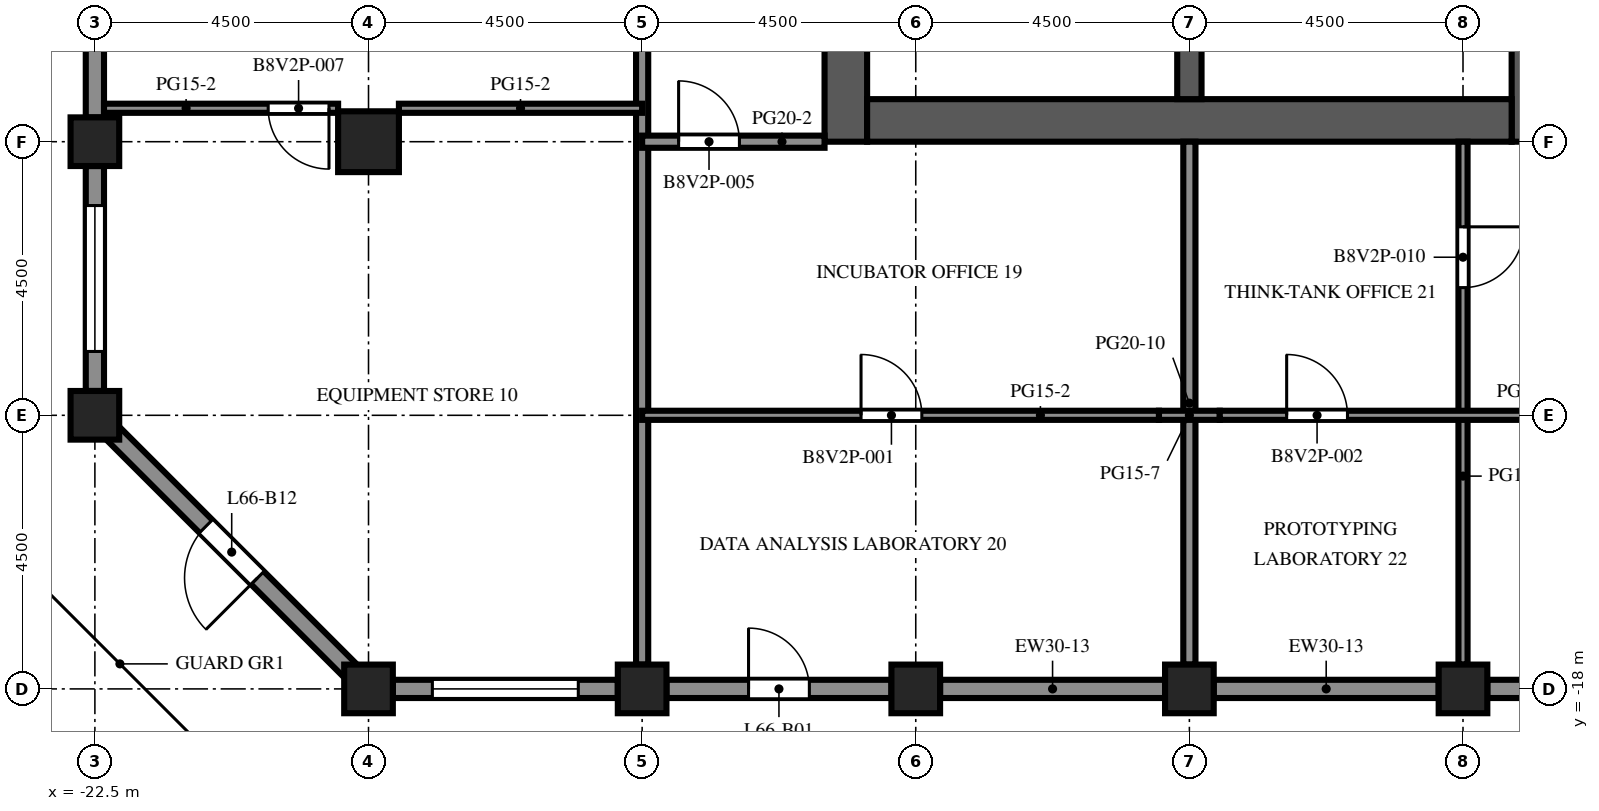
"""IFC4 building model, lengths in metres.
Left out: names, types, materials, properties, quantities, classifications, styles, units other than length and angle.
Written with IfcOpenShell. Run it as: python <this file> out.ifc"""

import sys

from ifc_helpers import new_model, si_unit, direction, frame, frame_2d, origin, origin_2d, place, context, subcontext, project, spatial, rectangle, extrude, element, fill, save


model = new_model("IFC4")
c1 = context("Model", 3, precision=1e-05, world=origin(), true_north=direction((0.0, 1.0)))
c2 = subcontext(c1, "Body", "Model", "MODEL_VIEW")
j1 = project(units=[si_unit("LENGTHUNIT", "METRE"), si_unit("PLANEANGLEUNIT", "RADIAN")], contexts=[c1])
p1 = place(None, origin())
s1 = spatial("IfcSite", under=j1, at=p1, CompositionType="ELEMENT")
p2 = place(p1, origin())
s2 = spatial("IfcBuilding", under=s1, at=p2, CompositionType="ELEMENT")
p3 = place(p2, frame((0.0, 0.0, 290.9)))
s3 = spatial("IfcBuildingStorey", under=s2, at=p3, CompositionType="ELEMENT", Elevation=290.9)
for number, where, z_axis, x_axis in (
    (1, (-22.5, -13.5, 0.0), (0.0, 0.0, 1.0), (1.0, 0.0, 0.0)),
    (2, (-22.5, -9.0, 0.0), (0.0, 0.0, 1.0), (1.0, 0.0, 0.0)),
    (3, (-18.0, -18.0, 0.0), (0.0, 0.0, 1.0), (1.0, 0.0, 0.0)),
    (4, (-13.5, -18.0, 0.0), (0.0, 0.0, 1.0), (1.0, 0.0, 0.0)),
    (5, (-9.0, -18.0, 0.0), (0.0, 0.0, 1.0), (1.0, 0.0, 0.0)),
    (6, (-4.5, -18.0, 0.0), (0.0, 0.0, 1.0), (1.0, 0.0, 0.0)),
    (7, (0.0, -18.0, 0.0), (0.0, 0.0, 1.0), (1.0, 0.0, 0.0)),
):
    element("IfcColumn", number, at=place(p3, frame(where, z_axis=z_axis, x_axis=x_axis)), inside=s3, PredefinedType="COLUMN", context=c2, shape_type="SweptSolid", body=[
        extrude(rectangle(XDim=0.8, YDim=0.8, at=origin_2d()), origin(), (0.0, 0.0, 1.0), 4.1),
    ])
p4 = place(p3, frame((-18.0, -9.0, 0.0), z_axis=(0.0, 0.0, 1.0), x_axis=(1.0, 0.0, 0.0)))
e8 = element("IfcColumn", 8, at=p4, inside=s3, PredefinedType="COLUMN", context=c2, shape_type="SweptSolid", body=[
    extrude(rectangle(XDim=1.0, YDim=1.0, at=origin_2d()), origin(), (0.0, 0.0, 1.0), 4.1),
])
p5 = place(p3, frame((-10.15, -9.0, 0.0), z_axis=(0.0, 0.0, 1.0), x_axis=(0.0, 1.0, 0.0)))
e9 = element("IfcWall", 9, at=p5, inside=s3, PredefinedType="SHEAR", context=c2, shape_type="SweptSolid", body=[
    extrude(rectangle(XDim=27.5, YDim=0.7, at=frame_2d((13.75, 0.0))), origin(), (0.0, 0.0, 1.0), 4.1),
])
p6 = place(p5, frame((12.55, 0.0, 0.0)))
e10 = element("IfcOpeningElement", 10, at=p6, cuts=e9, PredefinedType="OPENING", context=c2, shape_type="SweptSolid", body=[
    extrude(rectangle(XDim=2.4, YDim=2.4, at=frame_2d((1.2, 1.2))), frame((0.0, 0.36, 0.0), z_axis=(0.0, -1.0, 0.0), x_axis=(1.0, 0.0, 0.0)), (0.0, 0.0, 1.0), 0.72),
])
p7 = place(p5, frame((6.825, 0.0, 0.0)))
e11 = element("IfcOpeningElement", 11, at=p7, cuts=e9, PredefinedType="OPENING", context=c2, shape_type="SweptSolid", body=[
    extrude(rectangle(XDim=1.2, YDim=2.1, at=frame_2d((0.6, 1.05))), frame((0.0, 0.36, 0.0), z_axis=(0.0, -1.0, 0.0), x_axis=(1.0, 0.0, 0.0)), (0.0, 0.0, 1.0), 0.72),
])
p8 = place(p5, frame((19.475, 0.0, 0.0)))
e12 = element("IfcOpeningElement", 12, at=p8, cuts=e9, PredefinedType="OPENING", context=c2, shape_type="SweptSolid", body=[
    extrude(rectangle(XDim=1.2, YDim=2.1, at=frame_2d((0.6, 1.05))), frame((0.0, 0.36, 0.0), z_axis=(0.0, -1.0, 0.0), x_axis=(1.0, 0.0, 0.0)), (0.0, 0.0, 1.0), 0.72),
])
p9 = place(p3, frame((1.15, -9.0, 0.0), z_axis=(0.0, 0.0, 1.0), x_axis=(0.0, 1.0, 0.0)))
e13 = element("IfcWall", 13, at=p9, inside=s3, PredefinedType="SHEAR", context=c2, shape_type="SweptSolid", body=[
    extrude(rectangle(XDim=27.5, YDim=0.7, at=frame_2d((13.75, 0.0))), origin(), (0.0, 0.0, 1.0), 4.1),
])
p10 = place(p9, frame((12.55, 0.0, 0.0)))
e14 = element("IfcOpeningElement", 14, at=p10, cuts=e13, PredefinedType="OPENING", context=c2, shape_type="SweptSolid", body=[
    extrude(rectangle(XDim=2.4, YDim=2.4, at=frame_2d((1.2, 1.2))), frame((0.0, 0.36, 0.0), z_axis=(0.0, -1.0, 0.0), x_axis=(1.0, 0.0, 0.0)), (0.0, 0.0, 1.0), 0.72),
])
p11 = place(p9, frame((3.9, 0.0, 0.0)))
e15 = element("IfcOpeningElement", 15, at=p11, cuts=e13, PredefinedType="OPENING", context=c2, shape_type="SweptSolid", body=[
    extrude(rectangle(XDim=1.2, YDim=2.1, at=frame_2d((0.6, 1.05))), frame((0.0, 0.36, 0.0), z_axis=(0.0, -1.0, 0.0), x_axis=(1.0, 0.0, 0.0)), (0.0, 0.0, 1.0), 0.72),
])
p12 = place(p9, frame((22.4, 0.0, 0.0)))
e16 = element("IfcOpeningElement", 16, at=p12, cuts=e13, PredefinedType="OPENING", context=c2, shape_type="SweptSolid", body=[
    extrude(rectangle(XDim=1.2, YDim=2.1, at=frame_2d((0.6, 1.05))), frame((0.0, 0.36, 0.0), z_axis=(0.0, -1.0, 0.0), x_axis=(1.0, 0.0, 0.0)), (0.0, 0.0, 1.0), 0.72),
])
p13 = place(p3, frame((-9.8, -8.65, 0.0), z_axis=(0.0, 0.0, 1.0), x_axis=(1.0, 0.0, 0.0)))
e17 = element("IfcWall", 17, at=p13, inside=s3, PredefinedType="SHEAR", context=c2, shape_type="SweptSolid", body=[
    extrude(rectangle(XDim=10.6, YDim=0.7, at=frame_2d((5.3, 0.0))), origin(), (0.0, 0.0, 1.0), 4.1),
])
p14 = place(p3, frame((-4.5, -8.3, 0.0), z_axis=(0.0, 0.0, 1.0), x_axis=(0.0, 1.0, 0.0)))
e18 = element("IfcWall", 18, at=p14, inside=s3, PredefinedType="SHEAR", context=c2, shape_type="SweptSolid", body=[
    extrude(rectangle(XDim=7.6, YDim=0.4, at=frame_2d((3.8, 0.0))), origin(), (0.0, 0.0, 1.0), 4.1),
])
p15 = place(p3, frame((-13.9, -18.0, 0.0), z_axis=(0.0, 0.0, 1.0), x_axis=(-1.0, 0.0, 0.0)))
e19 = element("IfcWall", 19, at=p15, inside=s3, PredefinedType="SOLIDWALL", context=c2, shape_type="SweptSolid", body=[
    extrude(rectangle(XDim=3.7, YDim=0.3, at=frame_2d((1.85, 0.0))), origin(), (0.0, 0.0, 1.0), 2.7),
])
p16 = place(p15, frame((0.65, 0.0, 0.8)))
e20 = element("IfcOpeningElement", 20, at=p16, cuts=e19, PredefinedType="OPENING", context=c2, shape_type="SweptSolid", body=[
    extrude(rectangle(XDim=2.4, YDim=1.7, at=frame_2d((1.2, 0.85))), frame((0.0, 0.16, 0.0), z_axis=(0.0, -1.0, 0.0), x_axis=(1.0, 0.0, 0.0)), (0.0, 0.0, 1.0), 0.32),
])
p17 = place(p3, frame((-9.4, -18.0, 0.0), z_axis=(0.0, 0.0, 1.0), x_axis=(-1.0, 0.0, 0.0)))
e21 = element("IfcWall", 21, at=p17, inside=s3, PredefinedType="SOLIDWALL", context=c2, shape_type="SweptSolid", body=[
    extrude(rectangle(XDim=3.7, YDim=0.3, at=frame_2d((1.85, 0.0))), origin(), (0.0, 0.0, 1.0), 2.7),
])
p18 = place(p17, frame((1.35, 0.0, 0.0)))
e22 = element("IfcOpeningElement", 22, at=p18, cuts=e21, PredefinedType="OPENING", context=c2, shape_type="SweptSolid", body=[
    extrude(rectangle(XDim=1.0, YDim=2.2, at=frame_2d((0.5, 1.1))), frame((0.0, 0.16, 0.0), z_axis=(0.0, -1.0, 0.0), x_axis=(1.0, 0.0, 0.0)), (0.0, 0.0, 1.0), 0.32),
])
for number, where, z_axis, x_axis in (
    (23, (-4.9, -18.0, 0.0), (0.0, 0.0, 1.0), (-1.0, 0.0, 0.0)),
    (24, (-0.4, -18.0, 0.0), (0.0, 0.0, 1.0), (-1.0, 0.0, 0.0)),
    (25, (4.1, -18.0, 0.0), (0.0, 0.0, 1.0), (-1.0, 0.0, 0.0)),
):
    element("IfcWall", number, at=place(p3, frame(where, z_axis=z_axis, x_axis=x_axis)), inside=s3, PredefinedType="SOLIDWALL", context=c2, shape_type="SweptSolid", body=[
        extrude(rectangle(XDim=3.7, YDim=0.3, at=frame_2d((1.85, 0.0))), origin(), (0.0, 0.0, 1.0), 1.5),
    ])
p19 = place(p3, frame((-22.5, -8.6, 0.0), z_axis=(0.0, 0.0, 1.0), x_axis=(0.0, 1.0, 0.0)))
e26 = element("IfcWall", 26, at=p19, inside=s3, PredefinedType="SOLIDWALL", context=c2, shape_type="SweptSolid", body=[
    extrude(rectangle(XDim=3.7, YDim=0.3, at=frame_2d((1.85, 0.0))), origin(), (0.0, 0.0, 1.0), 2.7),
])
p20 = place(p19, frame((1.35, 0.0, 0.0)))
e27 = element("IfcOpeningElement", 27, at=p20, cuts=e26, PredefinedType="OPENING", context=c2, shape_type="SweptSolid", body=[
    extrude(rectangle(XDim=1.0, YDim=2.2, at=frame_2d((0.5, 1.1))), frame((0.0, 0.16, 0.0), z_axis=(0.0, -1.0, 0.0), x_axis=(1.0, 0.0, 0.0)), (0.0, 0.0, 1.0), 0.32),
])
p21 = place(p3, frame((-22.5, -13.1, 0.0), z_axis=(0.0, 0.0, 1.0), x_axis=(0.0, 1.0, 0.0)))
e28 = element("IfcWall", 28, at=p21, inside=s3, PredefinedType="SOLIDWALL", context=c2, shape_type="SweptSolid", body=[
    extrude(rectangle(XDim=3.7, YDim=0.3, at=frame_2d((1.85, 0.0))), origin(), (0.0, 0.0, 1.0), 2.7),
])
p22 = place(p21, frame((0.65, 0.0, 0.8)))
e29 = element("IfcOpeningElement", 29, at=p22, cuts=e28, PredefinedType="OPENING", context=c2, shape_type="SweptSolid", body=[
    extrude(rectangle(XDim=2.4, YDim=1.7, at=frame_2d((1.2, 0.85))), frame((0.0, 0.16, 0.0), z_axis=(0.0, -1.0, 0.0), x_axis=(1.0, 0.0, 0.0)), (0.0, 0.0, 1.0), 0.32),
])
p23 = place(p3, frame((-18.294, -17.706, 0.0), z_axis=(0.0, 0.0, 1.0), x_axis=(-0.707106781187, 0.707106781187, 0.0)))
e30 = element("IfcWall", 30, at=p23, inside=s3, PredefinedType="SOLIDWALL", context=c2, shape_type="SweptSolid", body=[
    extrude(rectangle(XDim=5.532, YDim=0.3, at=frame_2d((2.766, 0.0))), origin(), (0.0, 0.0, 1.0), 2.7),
])
p24 = place(p23, frame((2.166, 0.0, 0.0)))
e31 = element("IfcOpeningElement", 31, at=p24, cuts=e30, PredefinedType="OPENING", context=c2, shape_type="SweptSolid", body=[
    extrude(rectangle(XDim=1.2, YDim=2.2, at=frame_2d((0.6, 1.1))), frame((0.0, 0.16, 0.0), z_axis=(0.0, -1.0, 0.0), x_axis=(1.0, 0.0, 0.0)), (0.0, 0.0, 1.0), 0.32),
])
p25 = place(p3, frame((-0.7, -8.3, 0.0), z_axis=(0.0, 0.0, 1.0), x_axis=(0.0, 1.0, 0.0)))
e32 = element("IfcWall", 32, at=p25, inside=s3, PredefinedType="PARTITIONING", context=c2, shape_type="SweptSolid", body=[
    extrude(rectangle(XDim=2.28, YDim=0.1, at=frame_2d((1.14, 0.0))), origin(), (0.0, 0.0, 1.0), 3.5),
])
p26 = place(p25, frame((0.64, 0.0, 0.0)))
e33 = element("IfcOpeningElement", 33, at=p26, cuts=e32, PredefinedType="OPENING", context=c2, shape_type="SweptSolid", body=[
    extrude(rectangle(XDim=1.0, YDim=2.1, at=frame_2d((0.5, 1.05))), frame((0.0, 0.06, 0.0), z_axis=(0.0, -1.0, 0.0), x_axis=(1.0, 0.0, 0.0)), (0.0, 0.0, 1.0), 0.12),
])
p27 = place(p3, frame((-13.5, -17.6, 0.0), z_axis=(0.0, 0.0, 1.0), x_axis=(0.0, 1.0, 0.0)))
e34 = element("IfcWall", 34, at=p27, inside=s3, PredefinedType="PARTITIONING", context=c2, shape_type="SweptSolid", body=[
    extrude(rectangle(XDim=20.85, YDim=0.2, at=frame_2d((10.425, 0.0))), origin(), (0.0, 0.0, 1.0), 3.5),
])
p28 = place(p3, frame((-4.5, -17.6, 0.0), z_axis=(0.0, 0.0, 1.0), x_axis=(0.0, 1.0, 0.0)))
e35 = element("IfcWall", 35, at=p28, inside=s3, PredefinedType="PARTITIONING", context=c2, shape_type="SweptSolid", body=[
    extrude(rectangle(XDim=8.6, YDim=0.2, at=frame_2d((4.3, 0.0))), origin(), (0.0, 0.0, 1.0), 1.47),
])
p29 = place(p3, frame((0.0, -17.6, 0.0), z_axis=(0.0, 0.0, 1.0), x_axis=(0.0, 1.0, 0.0)))
e36 = element("IfcWall", 36, at=p29, inside=s3, PredefinedType="PARTITIONING", context=c2, shape_type="SweptSolid", body=[
    extrude(rectangle(XDim=8.6, YDim=0.15, at=frame_2d((4.3, 0.0))), origin(), (0.0, 0.0, 1.0), 3.5),
])
p30 = place(p29, frame((6.2, 0.0, 0.0)))
e37 = element("IfcOpeningElement", 37, at=p30, cuts=e36, PredefinedType="OPENING", context=c2, shape_type="SweptSolid", body=[
    extrude(rectangle(XDim=1.0, YDim=2.1, at=frame_2d((0.5, 1.05))), frame((0.0, 0.085, 0.0), z_axis=(0.0, -1.0, 0.0), x_axis=(1.0, 0.0, 0.0)), (0.0, 0.0, 1.0), 0.17),
])
p31 = place(p3, frame((-5.0, -13.5, 0.0), z_axis=(0.0, 0.0, 1.0), x_axis=(-1.0, 0.0, 0.0)))
e38 = element("IfcWall", 38, at=p31, inside=s3, PredefinedType="PARTITIONING", context=c2, shape_type="SweptSolid", body=[
    extrude(rectangle(XDim=8.5, YDim=0.15, at=frame_2d((4.25, 0.0))), origin(), (0.0, 0.0, 1.0), 3.5),
])
p32 = place(p31, frame((3.9, 0.0, 0.0)))
e39 = element("IfcOpeningElement", 39, at=p32, cuts=e38, PredefinedType="OPENING", context=c2, shape_type="SweptSolid", body=[
    extrude(rectangle(XDim=1.0, YDim=2.1, at=frame_2d((0.5, 1.05))), frame((0.0, 0.085, 0.0), z_axis=(0.0, -1.0, 0.0), x_axis=(1.0, 0.0, 0.0)), (0.0, 0.0, 1.0), 0.17),
])
p33 = place(p3, frame((-5.0, -13.5, 0.0), z_axis=(0.0, 0.0, 1.0), x_axis=(1.0, 0.0, 0.0)))
e40 = element("IfcWall", 40, at=p33, inside=s3, PredefinedType="PARTITIONING", context=c2, shape_type="SweptSolid", body=[
    extrude(rectangle(XDim=1.0, YDim=0.15, at=frame_2d((0.5, 0.0))), origin(), (0.0, 0.0, 1.0), 1.47),
])
p34 = place(p3, frame((4.0, -13.5, 0.0), z_axis=(0.0, 0.0, 1.0), x_axis=(-1.0, 0.0, 0.0)))
e41 = element("IfcWall", 41, at=p34, inside=s3, PredefinedType="PARTITIONING", context=c2, shape_type="SweptSolid", body=[
    extrude(rectangle(XDim=8.0, YDim=0.15, at=frame_2d((4.0, 0.0))), origin(), (0.0, 0.0, 1.0), 3.5),
])
p35 = place(p34, frame((5.9, 0.0, 0.0)))
e42 = element("IfcOpeningElement", 42, at=p35, cuts=e41, PredefinedType="OPENING", context=c2, shape_type="SweptSolid", body=[
    extrude(rectangle(XDim=1.0, YDim=2.1, at=frame_2d((0.5, 1.05))), frame((0.0, 0.085, 0.0), z_axis=(0.0, -1.0, 0.0), x_axis=(1.0, 0.0, 0.0)), (0.0, 0.0, 1.0), 0.17),
])
p36 = place(p3, frame((-10.5, -9.0, 0.0), z_axis=(0.0, 0.0, 1.0), x_axis=(-1.0, 0.0, 0.0)))
e43 = element("IfcWall", 43, at=p36, inside=s3, PredefinedType="PARTITIONING", context=c2, shape_type="SweptSolid", body=[
    extrude(rectangle(XDim=3.0, YDim=0.2, at=frame_2d((1.5, 0.0))), origin(), (0.0, 0.0, 1.0), 3.5),
])
p37 = place(p36, frame((1.4, 0.0, 0.0)))
e44 = element("IfcOpeningElement", 44, at=p37, cuts=e43, PredefinedType="OPENING", context=c2, shape_type="SweptSolid", body=[
    extrude(rectangle(XDim=1.0, YDim=2.1, at=frame_2d((0.5, 1.05))), frame((0.0, 0.11, 0.0), z_axis=(0.0, -1.0, 0.0), x_axis=(1.0, 0.0, 0.0)), (0.0, 0.0, 1.0), 0.22),
])
p38 = place(p3, frame((-18.5, -8.45, 0.0), z_axis=(0.0, 0.0, 1.0), x_axis=(-1.0, 0.0, 0.0)))
e45 = element("IfcWall", 45, at=p38, inside=s3, PredefinedType="PARTITIONING", context=c2, shape_type="SweptSolid", body=[
    extrude(rectangle(XDim=3.85, YDim=0.15, at=frame_2d((1.925, 0.0))), origin(), (0.0, 0.0, 1.0), 3.5),
])
p39 = place(p38, frame((0.15, 0.0, 0.0)))
e46 = element("IfcOpeningElement", 46, at=p39, cuts=e45, PredefinedType="OPENING", context=c2, shape_type="SweptSolid", body=[
    extrude(rectangle(XDim=1.0, YDim=2.1, at=frame_2d((0.5, 1.05))), frame((0.0, 0.085, 0.0), z_axis=(0.0, -1.0, 0.0), x_axis=(1.0, 0.0, 0.0)), (0.0, 0.0, 1.0), 0.17),
])
p40 = place(p3, frame((-17.5, -8.45, 0.0), z_axis=(0.0, 0.0, 1.0), x_axis=(1.0, 0.0, 0.0)))
e47 = element("IfcWall", 47, at=p40, inside=s3, PredefinedType="PARTITIONING", context=c2, shape_type="SweptSolid", body=[
    extrude(rectangle(XDim=4.0, YDim=0.15, at=frame_2d((2.0, 0.0))), origin(), (0.0, 0.0, 1.0), 3.5),
])
p41 = place(p16, origin())
e48 = element("IfcWindow", 48, at=p41, inside=s3, PartitioningType="SINGLE_PANEL", PredefinedType="WINDOW", context=c2, shape_type="SweptSolid", body=[
    extrude(rectangle(XDim=2.4, YDim=1.7, at=frame_2d((1.2, 0.85))), frame((0.0, 0.03, 0.0), z_axis=(0.0, -1.0, 0.0), x_axis=(1.0, 0.0, 0.0)), (0.0, 0.0, 1.0), 0.06),
])
fill(e20, e48)
p42 = place(p18, origin())
e49 = element("IfcDoor", 49, at=p42, inside=s3, OperationType="SINGLE_SWING_RIGHT", PredefinedType="DOOR", context=c2, shape_type="SweptSolid", body=[
    extrude(rectangle(XDim=1.0, YDim=2.2, at=frame_2d((0.5, 1.1))), frame((0.0, 0.025, 0.0), z_axis=(0.0, -1.0, 0.0), x_axis=(1.0, 0.0, 0.0)), (0.0, 0.0, 1.0), 0.05),
])
fill(e22, e49)
p43 = place(p22, origin())
e50 = element("IfcWindow", 50, at=p43, inside=s3, PartitioningType="SINGLE_PANEL", PredefinedType="WINDOW", context=c2, shape_type="SweptSolid", body=[
    extrude(rectangle(XDim=2.4, YDim=1.7, at=frame_2d((1.2, 0.85))), frame((0.0, 0.03, 0.0), z_axis=(0.0, -1.0, 0.0), x_axis=(1.0, 0.0, 0.0)), (0.0, 0.0, 1.0), 0.06),
])
fill(e29, e50)
p44 = place(p24, origin())
e51 = element("IfcDoor", 51, at=p44, inside=s3, OperationType="SINGLE_SWING_LEFT", PredefinedType="DOOR", context=c2, shape_type="SweptSolid", body=[
    extrude(rectangle(XDim=1.2, YDim=2.2, at=frame_2d((0.6, 1.1))), frame((0.0, 0.025, 0.0), z_axis=(0.0, -1.0, 0.0), x_axis=(1.0, 0.0, 0.0)), (0.0, 0.0, 1.0), 0.05),
])
fill(e31, e51)
p45 = place(p26, origin())
e52 = element("IfcDoor", 52, at=p45, inside=s3, OperationType="SINGLE_SWING_RIGHT", PredefinedType="DOOR", context=c2, shape_type="SweptSolid", body=[
    extrude(rectangle(XDim=1.0, YDim=2.1, at=frame_2d((0.5, 1.05))), frame((0.0, 0.025, 0.0), z_axis=(0.0, -1.0, 0.0), x_axis=(1.0, 0.0, 0.0)), (0.0, 0.0, 1.0), 0.05),
])
fill(e33, e52)
p46 = place(p32, origin())
e53 = element("IfcDoor", 53, at=p46, inside=s3, OperationType="SINGLE_SWING_RIGHT", PredefinedType="DOOR", context=c2, shape_type="SweptSolid", body=[
    extrude(rectangle(XDim=1.0, YDim=2.1, at=frame_2d((0.5, 1.05))), frame((0.0, 0.025, 0.0), z_axis=(0.0, -1.0, 0.0), x_axis=(1.0, 0.0, 0.0)), (0.0, 0.0, 1.0), 0.05),
])
fill(e39, e53)
p47 = place(p35, origin())
e54 = element("IfcDoor", 54, at=p47, inside=s3, OperationType="SINGLE_SWING_RIGHT", PredefinedType="DOOR", context=c2, shape_type="SweptSolid", body=[
    extrude(rectangle(XDim=1.0, YDim=2.1, at=frame_2d((0.5, 1.05))), frame((0.0, 0.025, 0.0), z_axis=(0.0, -1.0, 0.0), x_axis=(1.0, 0.0, 0.0)), (0.0, 0.0, 1.0), 0.05),
])
fill(e42, e54)
p48 = place(p37, origin())
e55 = element("IfcDoor", 55, at=p48, inside=s3, OperationType="SINGLE_SWING_RIGHT", PredefinedType="DOOR", context=c2, shape_type="SweptSolid", body=[
    extrude(rectangle(XDim=1.0, YDim=2.1, at=frame_2d((0.5, 1.05))), frame((0.0, 0.025, 0.0), z_axis=(0.0, -1.0, 0.0), x_axis=(1.0, 0.0, 0.0)), (0.0, 0.0, 1.0), 0.05),
])
fill(e44, e55)
p49 = place(p39, origin())
e56 = element("IfcDoor", 56, at=p49, inside=s3, OperationType="SINGLE_SWING_LEFT", PredefinedType="DOOR", context=c2, shape_type="SweptSolid", body=[
    extrude(rectangle(XDim=1.0, YDim=2.1, at=frame_2d((0.5, 1.05))), frame((0.0, 0.025, 0.0), z_axis=(0.0, -1.0, 0.0), x_axis=(1.0, 0.0, 0.0)), (0.0, 0.0, 1.0), 0.05),
])
fill(e46, e56)
p50 = place(p30, origin())
e57 = element("IfcDoor", 57, at=p50, inside=s3, OperationType="SINGLE_SWING_RIGHT", PredefinedType="DOOR", context=c2, shape_type="SweptSolid", body=[
    extrude(rectangle(XDim=1.0, YDim=2.1, at=frame_2d((0.5, 1.05))), frame((0.0, 0.025, 0.0), z_axis=(0.0, -1.0, 0.0), x_axis=(1.0, 0.0, 0.0)), (0.0, 0.0, 1.0), 0.05),
])
fill(e37, e57)
save(model, sys.argv[1])
